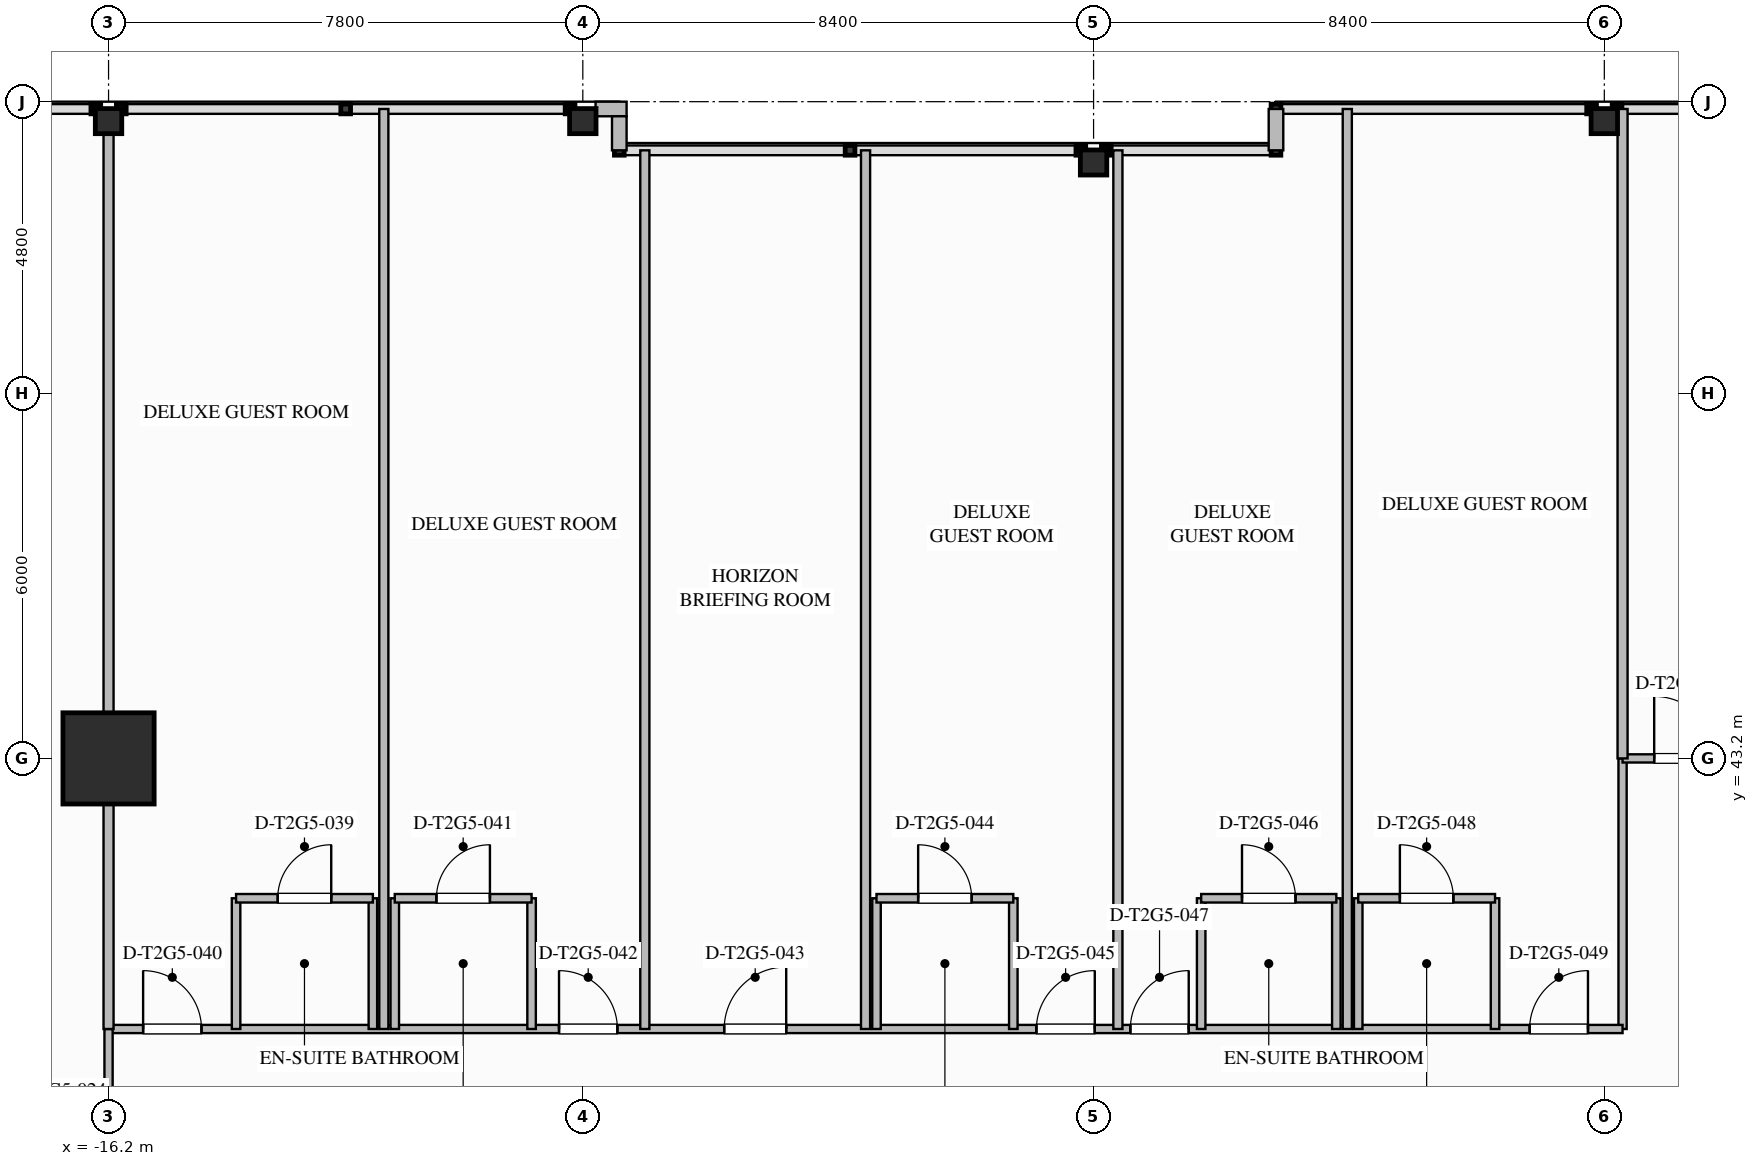
"""IFC4 building model, lengths in metres.
Left out: names, types, materials, properties, quantities, classifications, styles, units other than length and angle.
Written with IfcOpenShell. Run it as: python <this file> out.ifc"""

import sys

from ifc_helpers import new_model, si_unit, direction, frame, frame_2d, origin, origin_2d, place, context, subcontext, project, spatial, rectangle, i_section, extrude, element, fill, save


model = new_model("IFC4")
c1 = context("Model", 3, precision=1e-05, world=origin(), true_north=direction((0.0, 1.0)))
c2 = subcontext(c1, "Body", "Model", "MODEL_VIEW")
j1 = project(units=[si_unit("LENGTHUNIT", "METRE"), si_unit("PLANEANGLEUNIT", "RADIAN")], contexts=[c1])
p1 = place(None, origin())
s1 = spatial("IfcSite", under=j1, at=p1, CompositionType="ELEMENT")
p2 = place(p1, origin())
s2 = spatial("IfcBuilding", under=s1, at=p2, CompositionType="ELEMENT")
p3 = place(p2, frame((0.0, 0.0, 133.8)))
s3 = spatial("IfcBuildingStorey", under=s2, at=p3, CompositionType="ELEMENT", Elevation=133.8)
p4 = place(p3, frame((-16.2, 43.2, 0.0), z_axis=(0.0, 0.0, 1.0), x_axis=(1.0, 0.0, 0.0)))
e1 = element("IfcColumn", 1, at=p4, inside=s3, PredefinedType="COLUMN", context=c2, shape_type="SweptSolid", body=[
    extrude(rectangle(XDim=1.5, YDim=1.5, at=origin_2d()), origin(), (0.0, 0.0, 1.0), 3.5),
])
for number, where, z_axis, x_axis in (
    (2, (-16.2, 53.68, 0.0), (0.0, 0.0, 1.0), (0.0, 1.0, 0.0)),
    (3, (-8.4, 53.68, 0.0), (0.0, 0.0, 1.0), (0.0, 1.0, 0.0)),
    (4, (0.0, 53.0, 0.0), (0.0, 0.0, 1.0), (0.0, 1.0, 0.0)),
    (5, (8.4, 53.68, 0.0), (0.0, 0.0, 1.0), (0.0, 1.0, 0.0)),
):
    element("IfcColumn", number, at=place(p3, frame(where, z_axis=z_axis, x_axis=x_axis)), inside=s3, PredefinedType="COLUMN", context=c2, shape_type="SweptSolid", body=[
        extrude(i_section(OverallWidth=0.412, OverallDepth=0.435, WebThickness=0.036, FlangeThickness=0.057, FilletRadius=0.028, at=origin_2d()), origin(), (0.0, 0.0, 1.0), 3.497),
    ])
p5 = place(p3, frame((-8.191, 53.88, 0.0), z_axis=(0.0, 0.0, 1.0), x_axis=(1.0, 0.0, 0.0)))
e6 = element("IfcWall", 6, at=p5, inside=s3, PredefinedType="STANDARD", context=c2, shape_type="SweptSolid", body=[
    extrude(rectangle(XDim=0.511, YDim=0.24, at=frame_2d((0.255, 0.0))), origin(), (0.0, 0.0, 1.0), 3.24),
])
p6 = place(p3, frame((-7.8, 53.76, 0.0), z_axis=(0.0, 0.0, 1.0), x_axis=(0.0, -1.0, 0.0)))
e7 = element("IfcWall", 7, at=p6, inside=s3, PredefinedType="STANDARD", context=c2, shape_type="SweptSolid", body=[
    extrude(rectangle(XDim=0.56, YDim=0.24, at=frame_2d((0.28, 0.0))), origin(), (0.0, 0.0, 1.0), 3.24),
])
p7 = place(p3, frame((3.0, 53.2, 0.0), z_axis=(0.0, 0.0, 1.0), x_axis=(0.0, 1.0, 0.0)))
e8 = element("IfcWall", 8, at=p7, inside=s3, PredefinedType="STANDARD", context=c2, shape_type="SweptSolid", body=[
    extrude(rectangle(XDim=0.68, YDim=0.24, at=frame_2d((0.34, 0.0))), origin(), (0.0, 0.0, 1.0), 3.24),
])
p8 = place(p3, frame((8.7, 38.75, 0.0), z_axis=(0.0, 0.0, 1.0), x_axis=(0.0, 1.0, 0.0)))
e9 = element("IfcWall", 9, at=p8, inside=s3, PredefinedType="PARTITIONING", context=c2, shape_type="SweptSolid", body=[
    extrude(rectangle(XDim=4.45, YDim=0.135, at=frame_2d((2.225, 0.0))), origin(), (0.0, 0.0, 1.0), 3.24),
])
p9 = place(p3, frame((-16.2, 38.75, 0.0), z_axis=(0.0, 0.0, 1.0), x_axis=(1.0, 0.0, 0.0)))
e10 = element("IfcWall", 10, at=p9, inside=s3, PredefinedType="PARTITIONING", context=c2, shape_type="SweptSolid", body=[
    extrude(rectangle(XDim=24.9, YDim=0.135, at=frame_2d((12.45, 0.0))), origin(), (0.0, 0.0, 1.0), 3.24),
])
p10 = place(p9, frame((0.569, 0.0, 0.0)))
e11 = element("IfcOpeningElement", 11, at=p10, cuts=e10, PredefinedType="OPENING", context=c2, shape_type="SweptSolid", body=[
    extrude(rectangle(XDim=0.96, YDim=2.15, at=frame_2d((0.48, 1.075))), frame((0.0, 0.077, 0.0), z_axis=(0.0, -1.0, 0.0), x_axis=(1.0, 0.0, 0.0)), (0.0, 0.0, 1.0), 0.155),
])
p11 = place(p9, frame((7.409, 0.0, 0.0)))
e12 = element("IfcOpeningElement", 12, at=p11, cuts=e10, PredefinedType="OPENING", context=c2, shape_type="SweptSolid", body=[
    extrude(rectangle(XDim=0.96, YDim=2.15, at=frame_2d((0.48, 1.075))), frame((0.0, 0.077, 0.0), z_axis=(0.0, -1.0, 0.0), x_axis=(1.0, 0.0, 0.0)), (0.0, 0.0, 1.0), 0.155),
])
p12 = place(p9, frame((10.125, 0.0, 0.0)))
e13 = element("IfcOpeningElement", 13, at=p12, cuts=e10, PredefinedType="OPENING", context=c2, shape_type="SweptSolid", body=[
    extrude(rectangle(XDim=1.02, YDim=2.15, at=frame_2d((0.51, 1.075))), frame((0.0, 0.077, 0.0), z_axis=(0.0, -1.0, 0.0), x_axis=(1.0, 0.0, 0.0)), (0.0, 0.0, 1.0), 0.155),
])
p13 = place(p9, frame((15.26, 0.0, 0.0)))
e14 = element("IfcOpeningElement", 14, at=p13, cuts=e10, PredefinedType="OPENING", context=c2, shape_type="SweptSolid", body=[
    extrude(rectangle(XDim=0.96, YDim=2.15, at=frame_2d((0.48, 1.075))), frame((0.0, 0.077, 0.0), z_axis=(0.0, -1.0, 0.0), x_axis=(1.0, 0.0, 0.0)), (0.0, 0.0, 1.0), 0.155),
])
p14 = place(p9, frame((16.805, 0.0, 0.0)))
e15 = element("IfcOpeningElement", 15, at=p14, cuts=e10, PredefinedType="OPENING", context=c2, shape_type="SweptSolid", body=[
    extrude(rectangle(XDim=0.96, YDim=2.15, at=frame_2d((0.48, 1.075))), frame((0.0, 0.077, 0.0), z_axis=(0.0, -1.0, 0.0), x_axis=(1.0, 0.0, 0.0)), (0.0, 0.0, 1.0), 0.155),
])
p15 = place(p9, frame((23.371, 0.0, 0.0)))
e16 = element("IfcOpeningElement", 16, at=p15, cuts=e10, PredefinedType="OPENING", context=c2, shape_type="SweptSolid", body=[
    extrude(rectangle(XDim=0.96, YDim=2.15, at=frame_2d((0.48, 1.075))), frame((0.0, 0.077, 0.0), z_axis=(0.0, -1.0, 0.0), x_axis=(1.0, 0.0, 0.0)), (0.0, 0.0, 1.0), 0.155),
])
p16 = place(p3, frame((-16.2, 35.7, 0.0), z_axis=(0.0, 0.0, 1.0), x_axis=(0.0, 1.0, 0.0)))
e17 = element("IfcWall", 17, at=p16, inside=s3, PredefinedType="PARTITIONING", context=c2, shape_type="SweptSolid", body=[
    extrude(rectangle(XDim=3.05, YDim=0.135, at=frame_2d((1.525, 0.0))), origin(), (0.0, 0.0, 1.0), 2.53),
])
p17 = place(p16, frame((0.52, 0.0, 0.0)))
e18 = element("IfcOpeningElement", 18, at=p17, cuts=e17, PredefinedType="OPENING", context=c2, shape_type="SweptSolid", body=[
    extrude(rectangle(XDim=1.02, YDim=2.15, at=frame_2d((0.51, 1.075))), frame((0.0, 0.077, 0.0), z_axis=(0.0, -1.0, 0.0), x_axis=(1.0, 0.0, 0.0)), (0.0, 0.0, 1.0), 0.155),
])
p18 = place(p3, frame((8.7, 43.2, 0.0), z_axis=(0.0, 0.0, 1.0), x_axis=(1.0, 0.0, 0.0)))
e19 = element("IfcWall", 19, at=p18, inside=s3, PredefinedType="PARTITIONING", context=c2, shape_type="SweptSolid", body=[
    extrude(rectangle(XDim=2.45, YDim=0.135, at=frame_2d((1.225, 0.0))), origin(), (0.0, 0.0, 1.0), 2.53),
])
p19 = place(p18, frame((0.52, 0.0, 0.0)))
e20 = element("IfcOpeningElement", 20, at=p19, cuts=e19, PredefinedType="OPENING", context=c2, shape_type="SweptSolid", body=[
    extrude(rectangle(XDim=1.02, YDim=2.15, at=frame_2d((0.51, 1.075))), frame((0.0, 0.077, 0.0), z_axis=(0.0, -1.0, 0.0), x_axis=(1.0, 0.0, 0.0)), (0.0, 0.0, 1.0), 0.155),
])
p20 = place(p3, frame((-16.2, 38.75, 0.0), z_axis=(0.0, 0.0, 1.0), x_axis=(0.0, 1.0, 0.0)))
e21 = element("IfcWall", 21, at=p20, inside=s3, PredefinedType="PARTITIONING", context=c2, shape_type="SweptSolid", body=[
    extrude(rectangle(XDim=15.13, YDim=0.165, at=frame_2d((7.565, 0.0))), origin(), (0.0, 0.0, 1.0), 2.53),
])
p21 = place(p3, frame((8.7, 43.2, 0.0), z_axis=(0.0, 0.0, 1.0), x_axis=(0.0, 1.0, 0.0)))
e22 = element("IfcWall", 22, at=p21, inside=s3, PredefinedType="PARTITIONING", context=c2, shape_type="SweptSolid", body=[
    extrude(rectangle(XDim=10.68, YDim=0.165, at=frame_2d((5.34, 0.0))), origin(), (0.0, 0.0, 1.0), 2.53),
])
for number, where, z_axis, x_axis in (
    (23, (-14.103, 38.75, 0.0), (0.0, 0.0, 1.0), (0.0, 1.0, 0.0)),
    (24, (-11.853, 38.75, 0.0), (0.0, 0.0, 1.0), (0.0, 1.0, 0.0)),
):
    element("IfcWall", number, at=place(p3, frame(where, z_axis=z_axis, x_axis=x_axis)), inside=s3, PredefinedType="PLUMBINGWALL", context=c2, shape_type="SweptSolid", body=[
        extrude(rectangle(XDim=2.15, YDim=0.14, at=frame_2d((1.075, 0.0))), origin(), (0.0, 0.0, 1.0), 3.24),
    ])
p22 = place(p3, frame((-14.103, 40.9, 0.0), z_axis=(0.0, 0.0, 1.0), x_axis=(1.0, 0.0, 0.0)))
e25 = element("IfcWall", 25, at=p22, inside=s3, PredefinedType="PLUMBINGWALL", context=c2, shape_type="SweptSolid", body=[
    extrude(rectangle(XDim=2.25, YDim=0.14, at=frame_2d((1.125, 0.0))), origin(), (0.0, 0.0, 1.0), 3.24),
])
p23 = place(p22, frame((0.685, 0.0, 0.0)))
e26 = element("IfcOpeningElement", 26, at=p23, cuts=e25, PredefinedType="OPENING", context=c2, shape_type="SweptSolid", body=[
    extrude(rectangle(XDim=0.88, YDim=2.1, at=frame_2d((0.44, 1.05))), frame((0.0, 0.08, 0.0), z_axis=(0.0, -1.0, 0.0), x_axis=(1.0, 0.0, 0.0)), (0.0, 0.0, 1.0), 0.16),
])
p24 = place(p3, frame((-11.673, 38.75, 0.0), z_axis=(0.0, 0.0, 1.0), x_axis=(0.0, 1.0, 0.0)))
e27 = element("IfcWall", 27, at=p24, inside=s3, PredefinedType="PARTITIONING", context=c2, shape_type="SweptSolid", body=[
    extrude(rectangle(XDim=15.13, YDim=0.15, at=frame_2d((7.565, 0.0))), origin(), (0.0, 0.0, 1.0), 3.24),
])
for number, where, z_axis, x_axis in (
    (28, (-11.493, 38.75, 0.0), (0.0, 0.0, 1.0), (0.0, 1.0, 0.0)),
    (29, (-9.243, 38.75, 0.0), (0.0, 0.0, 1.0), (0.0, 1.0, 0.0)),
):
    element("IfcWall", number, at=place(p3, frame(where, z_axis=z_axis, x_axis=x_axis)), inside=s3, PredefinedType="PLUMBINGWALL", context=c2, shape_type="SweptSolid", body=[
        extrude(rectangle(XDim=2.15, YDim=0.14, at=frame_2d((1.075, 0.0))), origin(), (0.0, 0.0, 1.0), 3.24),
    ])
p25 = place(p3, frame((-11.493, 40.9, 0.0), z_axis=(0.0, 0.0, 1.0), x_axis=(1.0, 0.0, 0.0)))
e30 = element("IfcWall", 30, at=p25, inside=s3, PredefinedType="PLUMBINGWALL", context=c2, shape_type="SweptSolid", body=[
    extrude(rectangle(XDim=2.25, YDim=0.14, at=frame_2d((1.125, 0.0))), origin(), (0.0, 0.0, 1.0), 3.24),
])
p26 = place(p25, frame((0.685, 0.0, 0.0)))
e31 = element("IfcOpeningElement", 31, at=p26, cuts=e30, PredefinedType="OPENING", context=c2, shape_type="SweptSolid", body=[
    extrude(rectangle(XDim=0.88, YDim=2.1, at=frame_2d((0.44, 1.05))), frame((0.0, 0.08, 0.0), z_axis=(0.0, -1.0, 0.0), x_axis=(1.0, 0.0, 0.0)), (0.0, 0.0, 1.0), 0.16),
])
for number, where, z_axis, x_axis in (
    (32, (-7.38, 38.75, 0.0), (0.0, 0.0, 1.0), (0.0, 1.0, 0.0)),
    (33, (-3.75, 38.75, 0.0), (0.0, 0.0, 1.0), (0.0, 1.0, 0.0)),
):
    element("IfcWall", number, at=place(p3, frame(where, z_axis=z_axis, x_axis=x_axis)), inside=s3, PredefinedType="PARTITIONING", context=c2, shape_type="SweptSolid", body=[
        extrude(rectangle(XDim=14.45, YDim=0.15, at=frame_2d((7.225, 0.0))), origin(), (0.0, 0.0, 1.0), 3.24),
    ])
for number, where, z_axis, x_axis in (
    (34, (-3.57, 38.75, 0.0), (0.0, 0.0, 1.0), (0.0, 1.0, 0.0)),
    (35, (-1.32, 38.75, 0.0), (0.0, 0.0, 1.0), (0.0, 1.0, 0.0)),
):
    element("IfcWall", number, at=place(p3, frame(where, z_axis=z_axis, x_axis=x_axis)), inside=s3, PredefinedType="PLUMBINGWALL", context=c2, shape_type="SweptSolid", body=[
        extrude(rectangle(XDim=2.15, YDim=0.14, at=frame_2d((1.075, 0.0))), origin(), (0.0, 0.0, 1.0), 3.24),
    ])
p27 = place(p3, frame((-3.57, 40.9, 0.0), z_axis=(0.0, 0.0, 1.0), x_axis=(1.0, 0.0, 0.0)))
e36 = element("IfcWall", 36, at=p27, inside=s3, PredefinedType="PLUMBINGWALL", context=c2, shape_type="SweptSolid", body=[
    extrude(rectangle(XDim=2.25, YDim=0.14, at=frame_2d((1.125, 0.0))), origin(), (0.0, 0.0, 1.0), 3.24),
])
p28 = place(p27, frame((0.685, 0.0, 0.0)))
e37 = element("IfcOpeningElement", 37, at=p28, cuts=e36, PredefinedType="OPENING", context=c2, shape_type="SweptSolid", body=[
    extrude(rectangle(XDim=0.88, YDim=2.1, at=frame_2d((0.44, 1.05))), frame((0.0, 0.08, 0.0), z_axis=(0.0, -1.0, 0.0), x_axis=(1.0, 0.0, 0.0)), (0.0, 0.0, 1.0), 0.16),
])
p29 = place(p3, frame((0.4, 38.75, 0.0), z_axis=(0.0, 0.0, 1.0), x_axis=(0.0, 1.0, 0.0)))
e38 = element("IfcWall", 38, at=p29, inside=s3, PredefinedType="PARTITIONING", context=c2, shape_type="SweptSolid", body=[
    extrude(rectangle(XDim=14.45, YDim=0.15, at=frame_2d((7.225, 0.0))), origin(), (0.0, 0.0, 1.0), 3.24),
])
for number, where, z_axis, x_axis in (
    (39, (1.77, 38.75, 0.0), (0.0, 0.0, 1.0), (0.0, 1.0, 0.0)),
    (40, (3.993, 38.75, 0.0), (0.0, 0.0, 1.0), (0.0, 1.0, 0.0)),
):
    element("IfcWall", number, at=place(p3, frame(where, z_axis=z_axis, x_axis=x_axis)), inside=s3, PredefinedType="PLUMBINGWALL", context=c2, shape_type="SweptSolid", body=[
        extrude(rectangle(XDim=2.15, YDim=0.14, at=frame_2d((1.075, 0.0))), origin(), (0.0, 0.0, 1.0), 3.24),
    ])
p30 = place(p3, frame((1.77, 40.9, 0.0), z_axis=(0.0, 0.0, 1.0), x_axis=(1.0, 0.0, 0.0)))
e41 = element("IfcWall", 41, at=p30, inside=s3, PredefinedType="PLUMBINGWALL", context=c2, shape_type="SweptSolid", body=[
    extrude(rectangle(XDim=2.223, YDim=0.14, at=frame_2d((1.111, 0.0))), origin(), (0.0, 0.0, 1.0), 3.24),
])
p31 = place(p30, frame((0.671, 0.0, 0.0)))
e42 = element("IfcOpeningElement", 42, at=p31, cuts=e41, PredefinedType="OPENING", context=c2, shape_type="SweptSolid", body=[
    extrude(rectangle(XDim=0.88, YDim=2.1, at=frame_2d((0.44, 1.05))), frame((0.0, 0.08, 0.0), z_axis=(0.0, -1.0, 0.0), x_axis=(1.0, 0.0, 0.0)), (0.0, 0.0, 1.0), 0.16),
])
p32 = place(p3, frame((4.173, 38.75, 0.0), z_axis=(0.0, 0.0, 1.0), x_axis=(0.0, 1.0, 0.0)))
e43 = element("IfcWall", 43, at=p32, inside=s3, PredefinedType="PARTITIONING", context=c2, shape_type="SweptSolid", body=[
    extrude(rectangle(XDim=15.13, YDim=0.15, at=frame_2d((7.565, 0.0))), origin(), (0.0, 0.0, 1.0), 3.24),
])
for number, where, z_axis, x_axis in (
    (44, (4.353, 38.75, 0.0), (0.0, 0.0, 1.0), (0.0, 1.0, 0.0)),
    (45, (6.603, 38.75, 0.0), (0.0, 0.0, 1.0), (0.0, 1.0, 0.0)),
):
    element("IfcWall", number, at=place(p3, frame(where, z_axis=z_axis, x_axis=x_axis)), inside=s3, PredefinedType="PLUMBINGWALL", context=c2, shape_type="SweptSolid", body=[
        extrude(rectangle(XDim=2.15, YDim=0.14, at=frame_2d((1.075, 0.0))), origin(), (0.0, 0.0, 1.0), 3.24),
    ])
p33 = place(p3, frame((4.353, 40.9, 0.0), z_axis=(0.0, 0.0, 1.0), x_axis=(1.0, 0.0, 0.0)))
e46 = element("IfcWall", 46, at=p33, inside=s3, PredefinedType="PLUMBINGWALL", context=c2, shape_type="SweptSolid", body=[
    extrude(rectangle(XDim=2.25, YDim=0.14, at=frame_2d((1.125, 0.0))), origin(), (0.0, 0.0, 1.0), 3.24),
])
p34 = place(p33, frame((0.685, 0.0, 0.0)))
e47 = element("IfcOpeningElement", 47, at=p34, cuts=e46, PredefinedType="OPENING", context=c2, shape_type="SweptSolid", body=[
    extrude(rectangle(XDim=0.88, YDim=2.1, at=frame_2d((0.44, 1.05))), frame((0.0, 0.08, 0.0), z_axis=(0.0, -1.0, 0.0), x_axis=(1.0, 0.0, 0.0)), (0.0, 0.0, 1.0), 0.16),
])
p35 = place(p19, origin())
e48 = element("IfcDoor", 48, at=p35, inside=s3, OperationType="SINGLE_SWING_LEFT", PredefinedType="DOOR", context=c2, shape_type="SweptSolid", body=[
    extrude(rectangle(XDim=1.02, YDim=2.15, at=frame_2d((0.51, 1.075))), frame((0.0, 0.025, 0.0), z_axis=(0.0, -1.0, 0.0), x_axis=(1.0, 0.0, 0.0)), (0.0, 0.0, 1.0), 0.05),
])
fill(e20, e48)
p36 = place(p23, origin())
e49 = element("IfcDoor", 49, at=p36, inside=s3, OperationType="SINGLE_SWING_RIGHT", PredefinedType="DOOR", context=c2, shape_type="SweptSolid", body=[
    extrude(rectangle(XDim=0.88, YDim=2.1, at=frame_2d((0.44, 1.05))), frame((0.0, 0.025, 0.0), z_axis=(0.0, -1.0, 0.0), x_axis=(1.0, 0.0, 0.0)), (0.0, 0.0, 1.0), 0.05),
])
fill(e26, e49)
p37 = place(p10, origin())
e50 = element("IfcDoor", 50, at=p37, inside=s3, OperationType="SINGLE_SWING_LEFT", PredefinedType="DOOR", context=c2, shape_type="SweptSolid", body=[
    extrude(rectangle(XDim=0.96, YDim=2.15, at=frame_2d((0.48, 1.075))), frame((0.0, 0.025, 0.0), z_axis=(0.0, -1.0, 0.0), x_axis=(1.0, 0.0, 0.0)), (0.0, 0.0, 1.0), 0.05),
])
fill(e11, e50)
p38 = place(p26, origin())
e51 = element("IfcDoor", 51, at=p38, inside=s3, OperationType="SINGLE_SWING_RIGHT", PredefinedType="DOOR", context=c2, shape_type="SweptSolid", body=[
    extrude(rectangle(XDim=0.88, YDim=2.1, at=frame_2d((0.44, 1.05))), frame((0.0, 0.025, 0.0), z_axis=(0.0, -1.0, 0.0), x_axis=(1.0, 0.0, 0.0)), (0.0, 0.0, 1.0), 0.05),
])
fill(e31, e51)
p39 = place(p11, origin())
e52 = element("IfcDoor", 52, at=p39, inside=s3, OperationType="SINGLE_SWING_LEFT", PredefinedType="DOOR", context=c2, shape_type="SweptSolid", body=[
    extrude(rectangle(XDim=0.96, YDim=2.15, at=frame_2d((0.48, 1.075))), frame((0.0, 0.025, 0.0), z_axis=(0.0, -1.0, 0.0), x_axis=(1.0, 0.0, 0.0)), (0.0, 0.0, 1.0), 0.05),
])
fill(e12, e52)
p40 = place(p12, origin())
e53 = element("IfcDoor", 53, at=p40, inside=s3, OperationType="SINGLE_SWING_RIGHT", PredefinedType="DOOR", context=c2, shape_type="SweptSolid", body=[
    extrude(rectangle(XDim=1.02, YDim=2.15, at=frame_2d((0.51, 1.075))), frame((0.0, 0.025, 0.0), z_axis=(0.0, -1.0, 0.0), x_axis=(1.0, 0.0, 0.0)), (0.0, 0.0, 1.0), 0.05),
])
fill(e13, e53)
p41 = place(p28, origin())
e54 = element("IfcDoor", 54, at=p41, inside=s3, OperationType="SINGLE_SWING_LEFT", PredefinedType="DOOR", context=c2, shape_type="SweptSolid", body=[
    extrude(rectangle(XDim=0.88, YDim=2.1, at=frame_2d((0.44, 1.05))), frame((0.0, 0.025, 0.0), z_axis=(0.0, -1.0, 0.0), x_axis=(1.0, 0.0, 0.0)), (0.0, 0.0, 1.0), 0.05),
])
fill(e37, e54)
p42 = place(p13, origin())
e55 = element("IfcDoor", 55, at=p42, inside=s3, OperationType="SINGLE_SWING_RIGHT", PredefinedType="DOOR", context=c2, shape_type="SweptSolid", body=[
    extrude(rectangle(XDim=0.96, YDim=2.15, at=frame_2d((0.48, 1.075))), frame((0.0, 0.025, 0.0), z_axis=(0.0, -1.0, 0.0), x_axis=(1.0, 0.0, 0.0)), (0.0, 0.0, 1.0), 0.05),
])
fill(e14, e55)
p43 = place(p31, origin())
e56 = element("IfcDoor", 56, at=p43, inside=s3, OperationType="SINGLE_SWING_LEFT", PredefinedType="DOOR", context=c2, shape_type="SweptSolid", body=[
    extrude(rectangle(XDim=0.88, YDim=2.1, at=frame_2d((0.44, 1.05))), frame((0.0, 0.025, 0.0), z_axis=(0.0, -1.0, 0.0), x_axis=(1.0, 0.0, 0.0)), (0.0, 0.0, 1.0), 0.05),
])
fill(e42, e56)
p44 = place(p14, origin())
e57 = element("IfcDoor", 57, at=p44, inside=s3, OperationType="SINGLE_SWING_RIGHT", PredefinedType="DOOR", context=c2, shape_type="SweptSolid", body=[
    extrude(rectangle(XDim=0.96, YDim=2.15, at=frame_2d((0.48, 1.075))), frame((0.0, 0.025, 0.0), z_axis=(0.0, -1.0, 0.0), x_axis=(1.0, 0.0, 0.0)), (0.0, 0.0, 1.0), 0.05),
])
fill(e15, e57)
p45 = place(p34, origin())
e58 = element("IfcDoor", 58, at=p45, inside=s3, OperationType="SINGLE_SWING_LEFT", PredefinedType="DOOR", context=c2, shape_type="SweptSolid", body=[
    extrude(rectangle(XDim=0.88, YDim=2.1, at=frame_2d((0.44, 1.05))), frame((0.0, 0.025, 0.0), z_axis=(0.0, -1.0, 0.0), x_axis=(1.0, 0.0, 0.0)), (0.0, 0.0, 1.0), 0.05),
])
fill(e47, e58)
p46 = place(p15, origin())
e59 = element("IfcDoor", 59, at=p46, inside=s3, OperationType="SINGLE_SWING_RIGHT", PredefinedType="DOOR", context=c2, shape_type="SweptSolid", body=[
    extrude(rectangle(XDim=0.96, YDim=2.15, at=frame_2d((0.48, 1.075))), frame((0.0, 0.025, 0.0), z_axis=(0.0, -1.0, 0.0), x_axis=(1.0, 0.0, 0.0)), (0.0, 0.0, 1.0), 0.05),
])
fill(e16, e59)
save(model, sys.argv[1])
